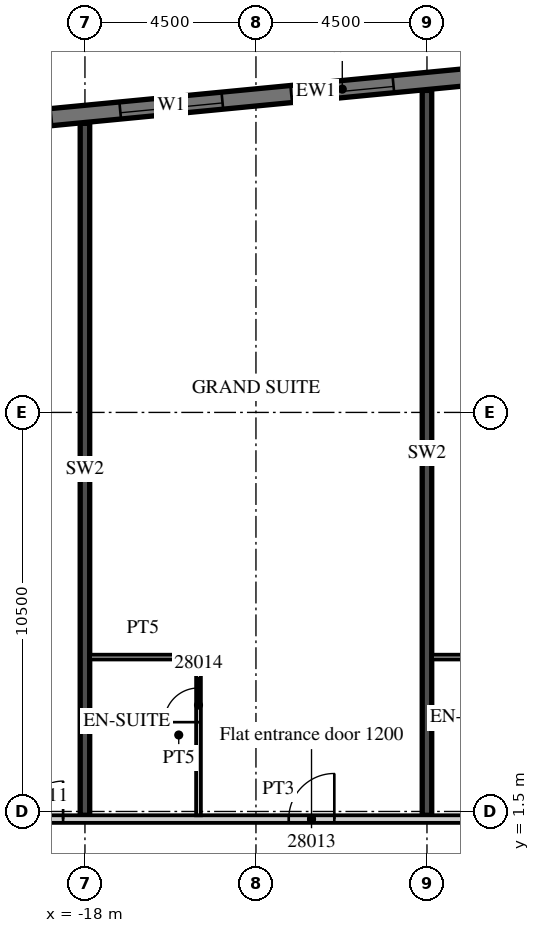
"""IFC4 building model, lengths in metres.
Left out: names, types, materials, properties, quantities, classifications, styles, units other than length and angle.
Written with IfcOpenShell. Run it as: python <this file> out.ifc"""

import sys

from ifc_helpers import new_model, si_unit, direction, frame, frame_2d, origin, place, context, subcontext, project, spatial, rectangle, extrude, element, fill, save


model = new_model("IFC4")
c1 = context("Model", 3, precision=1e-05, world=origin(), true_north=direction((0.0, 1.0)))
c2 = subcontext(c1, "Body", "Model", "MODEL_VIEW")
j1 = project(units=[si_unit("LENGTHUNIT", "METRE"), si_unit("PLANEANGLEUNIT", "RADIAN")], contexts=[c1])
p1 = place(None, origin())
s1 = spatial("IfcSite", under=j1, at=p1, CompositionType="ELEMENT")
p2 = place(p1, origin())
s2 = spatial("IfcBuilding", under=s1, at=p2, CompositionType="ELEMENT")
p3 = place(p2, frame((0.0, 0.0, 127.3)))
s3 = spatial("IfcBuildingStorey", under=s2, at=p3, CompositionType="ELEMENT", Elevation=127.3)
p4 = place(p3, frame((-18.0, 1.4, 0.0), z_axis=(0.0, 0.0, 1.0), x_axis=(0.0, 1.0, 0.0)))
e1 = element("IfcWall", 1, at=p4, inside=s3, PredefinedType="SHEAR", context=c2, shape_type="SweptSolid", body=[
    extrude(rectangle(XDim=18.207, YDim=0.25, at=frame_2d((9.104, 0.0))), origin(), (0.0, 0.0, 1.0), 3.3),
])
p5 = place(p3, frame((-9.0, 1.4, 0.0), z_axis=(0.0, 0.0, 1.0), x_axis=(0.0, 1.0, 0.0)))
e2 = element("IfcWall", 2, at=p5, inside=s3, PredefinedType="SHEAR", context=c2, shape_type="SweptSolid", body=[
    extrude(rectangle(XDim=19.073, YDim=0.25, at=frame_2d((9.537, 0.0))), origin(), (0.0, 0.0, 1.0), 3.3),
])
p6 = place(p3, frame((13.521, 22.89, 0.0), z_axis=(0.0, 0.0, 1.0), x_axis=(-0.995396445054, -0.095843190545, 0.0)))
e3 = element("IfcWall", 3, at=p6, inside=s3, PredefinedType="SOLIDWALL", context=c2, shape_type="SweptSolid", body=[
    extrude(rectangle(XDim=51.114, YDim=0.45, at=frame_2d((25.557, 0.0))), origin(), (0.0, 0.0, 1.0), 3.02),
])
p7 = place(p6, frame((0.91, 0.0, 0.45)))
e4 = element("IfcOpeningElement", 4, at=p7, cuts=e3, PredefinedType="OPENING", context=c2, shape_type="SweptSolid", body=[
    extrude(rectangle(XDim=2.7, YDim=2.25, at=frame_2d((1.35, 1.125))), frame((0.0, 0.235, 0.0), z_axis=(0.0, -1.0, 0.0), x_axis=(1.0, 0.0, 0.0)), (0.0, 0.0, 1.0), 0.47),
])
p8 = place(p6, frame((5.431, 0.0, 0.45)))
e5 = element("IfcOpeningElement", 5, at=p8, cuts=e3, PredefinedType="OPENING", context=c2, shape_type="SweptSolid", body=[
    extrude(rectangle(XDim=2.7, YDim=2.25, at=frame_2d((1.35, 1.125))), frame((0.0, 0.235, 0.0), z_axis=(0.0, -1.0, 0.0), x_axis=(1.0, 0.0, 0.0)), (0.0, 0.0, 1.0), 0.47),
])
p9 = place(p6, frame((9.952, 0.0, 0.45)))
e6 = element("IfcOpeningElement", 6, at=p9, cuts=e3, PredefinedType="OPENING", context=c2, shape_type="SweptSolid", body=[
    extrude(rectangle(XDim=2.7, YDim=2.25, at=frame_2d((1.35, 1.125))), frame((0.0, 0.235, 0.0), z_axis=(0.0, -1.0, 0.0), x_axis=(1.0, 0.0, 0.0)), (0.0, 0.0, 1.0), 0.47),
])
p10 = place(p6, frame((14.473, 0.0, 0.45)))
e7 = element("IfcOpeningElement", 7, at=p10, cuts=e3, PredefinedType="OPENING", context=c2, shape_type="SweptSolid", body=[
    extrude(rectangle(XDim=2.7, YDim=2.25, at=frame_2d((1.35, 1.125))), frame((0.0, 0.235, 0.0), z_axis=(0.0, -1.0, 0.0), x_axis=(1.0, 0.0, 0.0)), (0.0, 0.0, 1.0), 0.47),
])
p11 = place(p6, frame((18.994, 0.0, 0.45)))
e8 = element("IfcOpeningElement", 8, at=p11, cuts=e3, PredefinedType="OPENING", context=c2, shape_type="SweptSolid", body=[
    extrude(rectangle(XDim=2.7, YDim=2.25, at=frame_2d((1.35, 1.125))), frame((0.0, 0.235, 0.0), z_axis=(0.0, -1.0, 0.0), x_axis=(1.0, 0.0, 0.0)), (0.0, 0.0, 1.0), 0.47),
])
p12 = place(p6, frame((23.514, 0.0, 0.45)))
e9 = element("IfcOpeningElement", 9, at=p12, cuts=e3, PredefinedType="OPENING", context=c2, shape_type="SweptSolid", body=[
    extrude(rectangle(XDim=2.7, YDim=2.25, at=frame_2d((1.35, 1.125))), frame((0.0, 0.235, 0.0), z_axis=(0.0, -1.0, 0.0), x_axis=(1.0, 0.0, 0.0)), (0.0, 0.0, 1.0), 0.47),
])
p13 = place(p6, frame((28.035, 0.0, 0.45)))
e10 = element("IfcOpeningElement", 10, at=p13, cuts=e3, PredefinedType="OPENING", context=c2, shape_type="SweptSolid", body=[
    extrude(rectangle(XDim=2.7, YDim=2.25, at=frame_2d((1.35, 1.125))), frame((0.0, 0.235, 0.0), z_axis=(0.0, -1.0, 0.0), x_axis=(1.0, 0.0, 0.0)), (0.0, 0.0, 1.0), 0.47),
])
p14 = place(p6, frame((32.556, 0.0, 0.45)))
e11 = element("IfcOpeningElement", 11, at=p14, cuts=e3, PredefinedType="OPENING", context=c2, shape_type="SweptSolid", body=[
    extrude(rectangle(XDim=2.7, YDim=2.25, at=frame_2d((1.35, 1.125))), frame((0.0, 0.235, 0.0), z_axis=(0.0, -1.0, 0.0), x_axis=(1.0, 0.0, 0.0)), (0.0, 0.0, 1.0), 0.47),
])
p15 = place(p6, frame((37.077, 0.0, 0.45)))
e12 = element("IfcOpeningElement", 12, at=p15, cuts=e3, PredefinedType="OPENING", context=c2, shape_type="SweptSolid", body=[
    extrude(rectangle(XDim=2.7, YDim=2.25, at=frame_2d((1.35, 1.125))), frame((0.0, 0.235, 0.0), z_axis=(0.0, -1.0, 0.0), x_axis=(1.0, 0.0, 0.0)), (0.0, 0.0, 1.0), 0.47),
])
p16 = place(p6, frame((41.598, 0.0, 0.45)))
e13 = element("IfcOpeningElement", 13, at=p16, cuts=e3, PredefinedType="OPENING", context=c2, shape_type="SweptSolid", body=[
    extrude(rectangle(XDim=2.7, YDim=2.25, at=frame_2d((1.35, 1.125))), frame((0.0, 0.235, 0.0), z_axis=(0.0, -1.0, 0.0), x_axis=(1.0, 0.0, 0.0)), (0.0, 0.0, 1.0), 0.47),
])
p17 = place(p6, frame((46.118, 0.0, 0.45)))
e14 = element("IfcOpeningElement", 14, at=p17, cuts=e3, PredefinedType="OPENING", context=c2, shape_type="SweptSolid", body=[
    extrude(rectangle(XDim=2.7, YDim=2.25, at=frame_2d((1.35, 1.125))), frame((0.0, 0.235, 0.0), z_axis=(0.0, -1.0, 0.0), x_axis=(1.0, 0.0, 0.0)), (0.0, 0.0, 1.0), 0.47),
])
p18 = place(p3, frame((-39.316, 1.3, 0.0), z_axis=(0.0, 0.0, 1.0), x_axis=(1.0, 0.0, 0.0)))
e15 = element("IfcWall", 15, at=p18, inside=s3, PredefinedType="PARTITIONING", context=c2, shape_type="SweptSolid", body=[
    extrude(rectangle(XDim=52.816, YDim=0.2, at=frame_2d((26.408, 0.0))), origin(), (0.0, 0.0, 1.0), 3.02),
])
p19 = place(p18, frame((0.15, 0.0, 0.0)))
e16 = element("IfcOpeningElement", 16, at=p19, cuts=e15, PredefinedType="OPENING", context=c2, shape_type="SweptSolid", body=[
    extrude(rectangle(XDim=0.9, YDim=2.1, at=frame_2d((0.45, 1.05))), frame((0.0, 0.11, 0.0), z_axis=(0.0, -1.0, 0.0), x_axis=(1.0, 0.0, 0.0)), (0.0, 0.0, 1.0), 0.22),
])
p20 = place(p18, frame((3.891, 0.0, 0.0)))
e17 = element("IfcOpeningElement", 17, at=p20, cuts=e15, PredefinedType="OPENING", context=c2, shape_type="SweptSolid", body=[
    extrude(rectangle(XDim=1.0, YDim=2.1, at=frame_2d((0.5, 1.05))), frame((0.0, 0.11, 0.0), z_axis=(0.0, -1.0, 0.0), x_axis=(1.0, 0.0, 0.0)), (0.0, 0.0, 1.0), 0.22),
])
p21 = place(p18, frame((10.741, 0.0, 0.0)))
e18 = element("IfcOpeningElement", 18, at=p21, cuts=e15, PredefinedType="OPENING", context=c2, shape_type="SweptSolid", body=[
    extrude(rectangle(XDim=1.0, YDim=2.1, at=frame_2d((0.5, 1.05))), frame((0.0, 0.11, 0.0), z_axis=(0.0, -1.0, 0.0), x_axis=(1.0, 0.0, 0.0)), (0.0, 0.0, 1.0), 0.22),
])
p22 = place(p18, frame((15.266, 0.0, 0.0)))
e19 = element("IfcOpeningElement", 19, at=p22, cuts=e15, PredefinedType="OPENING", context=c2, shape_type="SweptSolid", body=[
    extrude(rectangle(XDim=1.0, YDim=2.1, at=frame_2d((0.5, 1.05))), frame((0.0, 0.11, 0.0), z_axis=(0.0, -1.0, 0.0), x_axis=(1.0, 0.0, 0.0)), (0.0, 0.0, 1.0), 0.22),
])
p23 = place(p18, frame((19.741, 0.0, 0.0)))
e20 = element("IfcOpeningElement", 20, at=p23, cuts=e15, PredefinedType="OPENING", context=c2, shape_type="SweptSolid", body=[
    extrude(rectangle(XDim=1.0, YDim=2.1, at=frame_2d((0.5, 1.05))), frame((0.0, 0.11, 0.0), z_axis=(0.0, -1.0, 0.0), x_axis=(1.0, 0.0, 0.0)), (0.0, 0.0, 1.0), 0.22),
])
p24 = place(p18, frame((26.678, 0.0, 0.0)))
e21 = element("IfcOpeningElement", 21, at=p24, cuts=e15, PredefinedType="OPENING", context=c2, shape_type="SweptSolid", body=[
    extrude(rectangle(XDim=1.2, YDim=2.1, at=frame_2d((0.6, 1.05))), frame((0.0, 0.11, 0.0), z_axis=(0.0, -1.0, 0.0), x_axis=(1.0, 0.0, 0.0)), (0.0, 0.0, 1.0), 0.22),
])
p25 = place(p18, frame((35.678, 0.0, 0.0)))
e22 = element("IfcOpeningElement", 22, at=p25, cuts=e15, PredefinedType="OPENING", context=c2, shape_type="SweptSolid", body=[
    extrude(rectangle(XDim=1.2, YDim=2.1, at=frame_2d((0.6, 1.05))), frame((0.0, 0.11, 0.0), z_axis=(0.0, -1.0, 0.0), x_axis=(1.0, 0.0, 0.0)), (0.0, 0.0, 1.0), 0.22),
])
p26 = place(p18, frame((41.754, 0.0, 0.0)))
e23 = element("IfcOpeningElement", 23, at=p26, cuts=e15, PredefinedType="OPENING", context=c2, shape_type="SweptSolid", body=[
    extrude(rectangle(XDim=1.2, YDim=2.1, at=frame_2d((0.6, 1.05))), frame((0.0, 0.11, 0.0), z_axis=(0.0, -1.0, 0.0), x_axis=(1.0, 0.0, 0.0)), (0.0, 0.0, 1.0), 0.22),
])
p27 = place(p18, frame((51.241, 0.0, 0.0)))
e24 = element("IfcOpeningElement", 24, at=p27, cuts=e15, PredefinedType="OPENING", context=c2, shape_type="SweptSolid", body=[
    extrude(rectangle(XDim=1.0, YDim=2.1, at=frame_2d((0.5, 1.05))), frame((0.0, 0.11, 0.0), z_axis=(0.0, -1.0, 0.0), x_axis=(1.0, 0.0, 0.0)), (0.0, 0.0, 1.0), 0.22),
])
p28 = place(p3, frame((-15.012, 1.4, 0.0), z_axis=(0.0, 0.0, 1.0), x_axis=(0.0, 1.0, 0.0)))
e25 = element("IfcWall", 25, at=p28, inside=s3, PredefinedType="PARTITIONING", context=c2, shape_type="SweptSolid", body=[
    extrude(rectangle(XDim=4.225, YDim=0.125, at=frame_2d((2.113, 0.0))), origin(), (0.0, 0.0, 1.0), 3.02),
])
p29 = place(p28, frame((2.45, 0.0, 0.0)))
e26 = element("IfcOpeningElement", 26, at=p29, cuts=e25, PredefinedType="OPENING", context=c2, shape_type="SweptSolid", body=[
    extrude(rectangle(XDim=0.9, YDim=2.1, at=frame_2d((0.45, 1.05))), frame((0.0, 0.073, 0.0), z_axis=(0.0, -1.0, 0.0), x_axis=(1.0, 0.0, 0.0)), (0.0, 0.0, 1.0), 0.145),
])
for number, where, z_axis, x_axis in (
    (27, (-17.875, 5.562, 0.0), (0.0, 0.0, 1.0), (1.0, 0.0, 0.0)),
    (28, (-8.875, 5.562, 0.0), (0.0, 0.0, 1.0), (1.0, 0.0, 0.0)),
):
    element("IfcWall", number, at=place(p3, frame(where, z_axis=z_axis, x_axis=x_axis)), inside=s3, PredefinedType="PARTITIONING", context=c2, shape_type="SweptSolid", body=[
        extrude(rectangle(XDim=2.8, YDim=0.125, at=frame_2d((1.4, 0.0))), origin(), (0.0, 0.0, 1.0), 3.02),
    ])
p30 = place(p12, origin())
e29 = element("IfcWindow", 29, at=p30, inside=s3, PartitioningType="SINGLE_PANEL", PredefinedType="WINDOW", context=c2, shape_type="SweptSolid", body=[
    extrude(rectangle(XDim=2.7, YDim=2.25, at=frame_2d((1.35, 1.125))), frame((0.0, 0.09, 0.0), z_axis=(0.0, -1.0, 0.0), x_axis=(1.0, 0.0, 0.0)), (0.0, 0.0, 1.0), 0.06),
])
fill(e9, e29)
p31 = place(p13, origin())
e30 = element("IfcWindow", 30, at=p31, inside=s3, PartitioningType="SINGLE_PANEL", PredefinedType="WINDOW", context=c2, shape_type="SweptSolid", body=[
    extrude(rectangle(XDim=2.7, YDim=2.25, at=frame_2d((1.35, 1.125))), frame((0.0, 0.09, 0.0), z_axis=(0.0, -1.0, 0.0), x_axis=(1.0, 0.0, 0.0)), (0.0, 0.0, 1.0), 0.06),
])
fill(e10, e30)
p32 = place(p23, origin())
e31 = element("IfcDoor", 31, at=p32, inside=s3, OperationType="SINGLE_SWING_RIGHT", PredefinedType="DOOR", context=c2, shape_type="SweptSolid", body=[
    extrude(rectangle(XDim=1.0, YDim=2.1, at=frame_2d((0.5, 1.05))), frame((0.0, 0.025, 0.0), z_axis=(0.0, -1.0, 0.0), x_axis=(1.0, 0.0, 0.0)), (0.0, 0.0, 1.0), 0.05),
])
fill(e20, e31)
p33 = place(p24, origin())
e32 = element("IfcDoor", 32, at=p33, inside=s3, OperationType="SINGLE_SWING_RIGHT", PredefinedType="DOOR", context=c2, shape_type="SweptSolid", body=[
    extrude(rectangle(XDim=1.2, YDim=2.1, at=frame_2d((0.6, 1.05))), frame((0.0, 0.025, 0.0), z_axis=(0.0, -1.0, 0.0), x_axis=(1.0, 0.0, 0.0)), (0.0, 0.0, 1.0), 0.05),
])
fill(e21, e32)
p34 = place(p29, origin())
e33 = element("IfcDoor", 33, at=p34, inside=s3, OperationType="SINGLE_SWING_LEFT", PredefinedType="DOOR", context=c2, shape_type="SweptSolid", body=[
    extrude(rectangle(XDim=0.9, YDim=2.1, at=frame_2d((0.45, 1.05))), frame((0.0, 0.025, 0.0), z_axis=(0.0, -1.0, 0.0), x_axis=(1.0, 0.0, 0.0)), (0.0, 0.0, 1.0), 0.05),
])
fill(e26, e33)
save(model, sys.argv[1])
